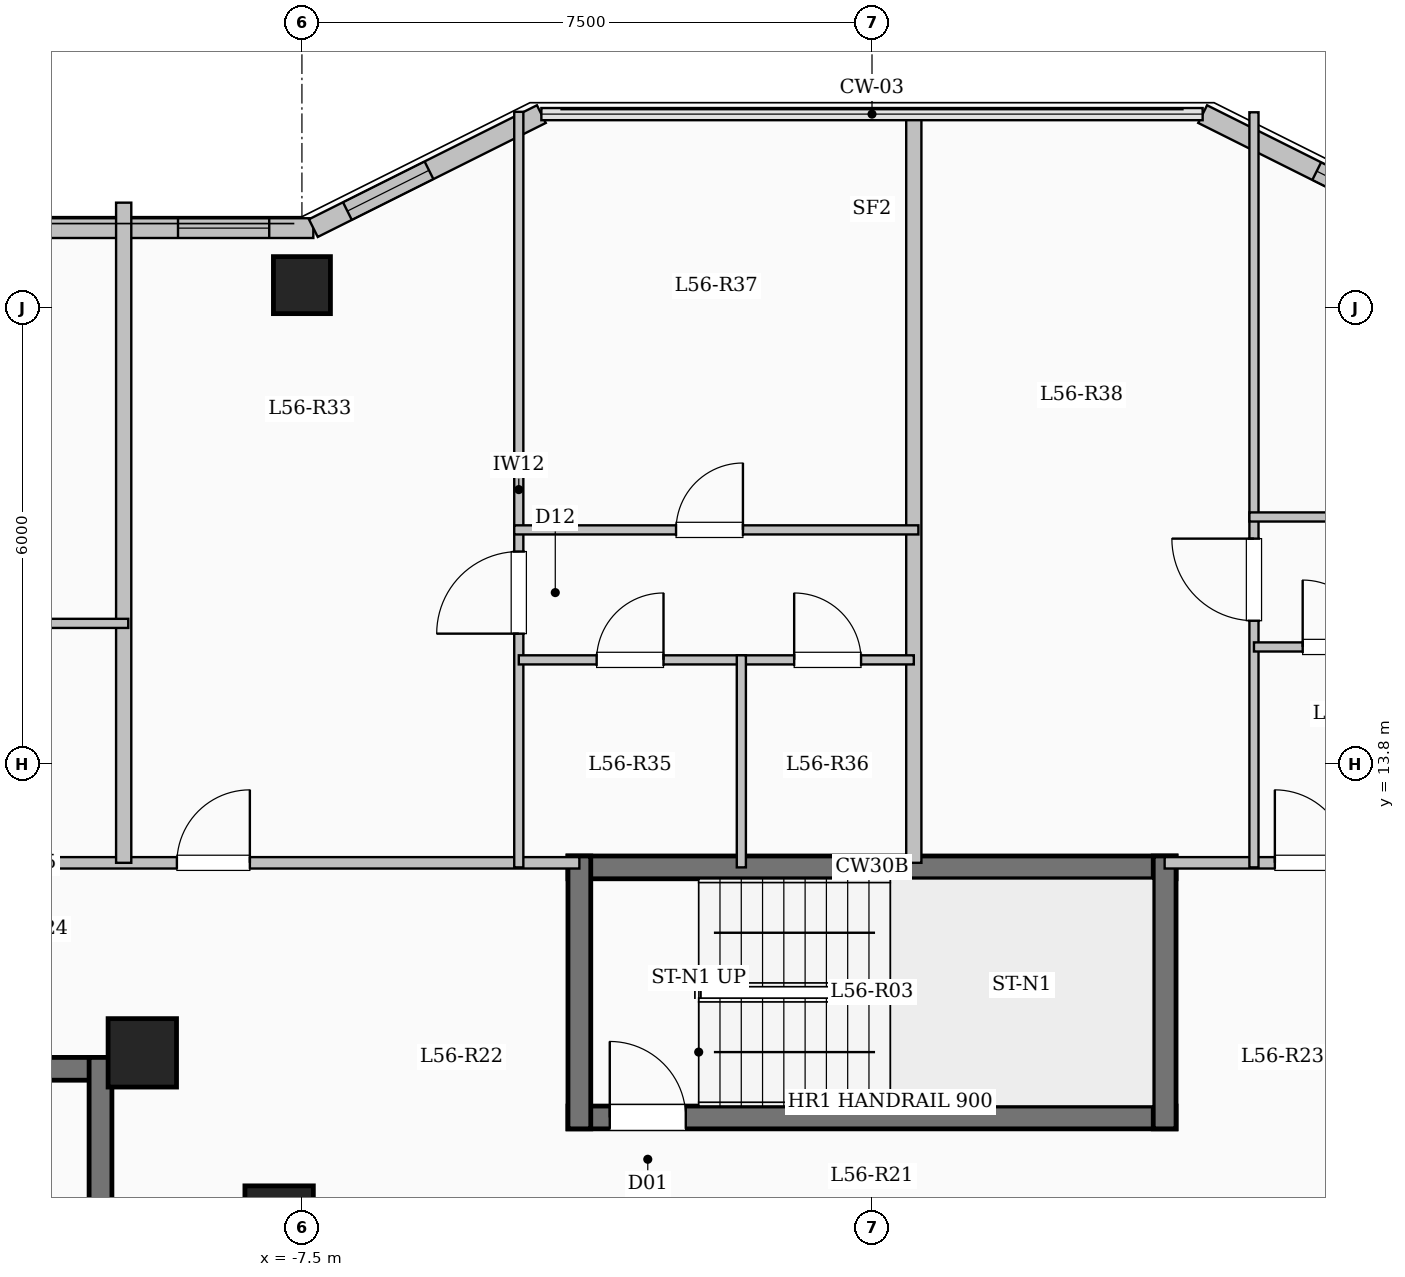
"""IFC4 building model, lengths in metres.
Left out: names, types, materials, properties, quantities, classifications, styles, units other than length and angle.
Written with IfcOpenShell. Run it as: python <this file> out.ifc"""

import sys

from ifc_helpers import new_model, si_unit, direction, frame, frame_2d, origin, origin_2d, place, context, subcontext, project, spatial, rectangle, extrude, element, fill, save


model = new_model("IFC4")
c1 = context("Model", 3, precision=1e-05, world=origin(), true_north=direction((0.0, 1.0)))
c2 = subcontext(c1, "Body", "Model", "MODEL_VIEW")
j1 = project(units=[si_unit("LENGTHUNIT", "METRE"), si_unit("PLANEANGLEUNIT", "RADIAN")], contexts=[c1])
p1 = place(None, origin())
s1 = spatial("IfcSite", under=j1, at=p1, CompositionType="ELEMENT")
p2 = place(p1, origin())
s2 = spatial("IfcBuilding", under=s1, at=p2, CompositionType="ELEMENT")
p3 = place(p2, frame((0.0, 0.0, 207.0)))
s3 = spatial("IfcBuildingStorey", under=s2, at=p3, CompositionType="ELEMENT", Elevation=207.0)
for number, where, z_axis, x_axis in (
    (1, (-7.8, 7.8, 0.0), (0.0, 0.0, 1.0), (1.0, 0.0, 0.0)),
    (2, (-9.6, 10.0, 0.0), (0.0, 0.0, 1.0), (1.0, 0.0, 0.0)),
):
    element("IfcColumn", number, at=place(p3, frame(where, z_axis=z_axis, x_axis=x_axis)), inside=s3, PredefinedType="COLUMN", context=c2, shape_type="SweptSolid", body=[
        extrude(rectangle(XDim=0.9, YDim=0.9, at=origin_2d()), origin(), (0.0, 0.0, 1.0), 3.35),
    ])
p4 = place(p3, frame((-7.5, 20.1, 0.0), z_axis=(0.0, 0.0, 1.0), x_axis=(1.0, 0.0, 0.0)))
e3 = element("IfcColumn", 3, at=p4, inside=s3, PredefinedType="COLUMN", context=c2, shape_type="SweptSolid", body=[
    extrude(rectangle(XDim=0.75, YDim=0.75, at=origin_2d()), origin(), (0.0, 0.0, 1.0), 3.35),
])
p5 = place(p3, frame((-18.45, 20.85, 0.0), z_axis=(0.0, 0.0, 1.0), x_axis=(1.0, 0.0, 0.0)))
e4 = element("IfcWall", 4, at=p5, inside=s3, PredefinedType="SOLIDWALL", context=c2, shape_type="SweptSolid", body=[
    extrude(rectangle(XDim=11.1, YDim=0.26, at=frame_2d((5.55, 0.0))), origin(), (0.0, 0.0, 1.0), 3.1),
])
p6 = place(p5, frame((1.11, 0.0, 0.9)))
e5 = element("IfcOpeningElement", 5, at=p6, cuts=e4, PredefinedType="OPENING", context=c2, shape_type="SweptSolid", body=[
    extrude(rectangle(XDim=2.2, YDim=1.75, at=frame_2d((1.1, 0.875))), frame((0.0, 0.14, 0.0), z_axis=(0.0, -1.0, 0.0), x_axis=(1.0, 0.0, 0.0)), (0.0, 0.0, 1.0), 0.28),
])
p7 = place(p5, frame((5.654, 0.0, 0.9)))
e6 = element("IfcOpeningElement", 6, at=p7, cuts=e4, PredefinedType="OPENING", context=c2, shape_type="SweptSolid", body=[
    extrude(rectangle(XDim=1.65, YDim=1.6, at=frame_2d((0.825, 0.8))), frame((0.0, 0.14, 0.0), z_axis=(0.0, -1.0, 0.0), x_axis=(1.0, 0.0, 0.0)), (0.0, 0.0, 1.0), 0.28),
])
p8 = place(p5, frame((9.32, 0.0, 0.95)))
e7 = element("IfcOpeningElement", 7, at=p8, cuts=e4, PredefinedType="OPENING", context=c2, shape_type="SweptSolid", body=[
    extrude(rectangle(XDim=1.2, YDim=1.5, at=frame_2d((0.6, 0.75))), frame((0.0, 0.14, 0.0), z_axis=(0.0, -1.0, 0.0), x_axis=(1.0, 0.0, 0.0)), (0.0, 0.0, 1.0), 0.28),
])
p9 = place(p3, frame((-7.35, 20.85, 0.0), z_axis=(0.0, 0.0, 1.0), x_axis=(0.894427191, 0.4472135955, 0.0)))
e8 = element("IfcWall", 8, at=p9, inside=s3, PredefinedType="SOLIDWALL", context=c2, shape_type="SweptSolid", body=[
    extrude(rectangle(XDim=3.354, YDim=0.26, at=frame_2d((1.677, 0.0))), origin(), (0.0, 0.0, 1.0), 3.1),
])
p10 = place(p9, frame((0.501, 0.0, 0.95)))
e9 = element("IfcOpeningElement", 9, at=p10, cuts=e8, PredefinedType="OPENING", context=c2, shape_type="SweptSolid", body=[
    extrude(rectangle(XDim=1.2, YDim=1.5, at=frame_2d((0.6, 0.75))), frame((0.0, 0.14, 0.0), z_axis=(0.0, -1.0, 0.0), x_axis=(1.0, 0.0, 0.0)), (0.0, 0.0, 1.0), 0.28),
])
p11 = place(p3, frame((4.35, 22.35, 0.0), z_axis=(0.0, 0.0, 1.0), x_axis=(0.894427191, -0.4472135955, 0.0)))
e10 = element("IfcWall", 10, at=p11, inside=s3, PredefinedType="SOLIDWALL", context=c2, shape_type="SweptSolid", body=[
    extrude(rectangle(XDim=3.354, YDim=0.26, at=frame_2d((1.677, 0.0))), origin(), (0.0, 0.0, 1.0), 3.1),
])
p12 = place(p11, frame((1.678, 0.0, 0.95)))
e11 = element("IfcOpeningElement", 11, at=p12, cuts=e10, PredefinedType="OPENING", context=c2, shape_type="SweptSolid", body=[
    extrude(rectangle(XDim=1.2, YDim=1.5, at=frame_2d((0.6, 0.75))), frame((0.0, 0.14, 0.0), z_axis=(0.0, -1.0, 0.0), x_axis=(1.0, 0.0, 0.0)), (0.0, 0.0, 1.0), 0.28),
])
p13 = place(p3, frame((-18.0, 9.79, 0.0), z_axis=(0.0, 0.0, 1.0), x_axis=(1.0, 0.0, 0.0)))
e12 = element("IfcWall", 12, at=p13, inside=s3, PredefinedType="SHEAR", context=c2, shape_type="SweptSolid", body=[
    extrude(rectangle(XDim=8.0, YDim=0.3, at=frame_2d((4.0, 0.0))), origin(), (0.0, 0.0, 1.0), 3.35),
])
p14 = place(p3, frame((-10.15, 6.35, 0.0), z_axis=(0.0, 0.0, 1.0), x_axis=(0.0, 1.0, 0.0)))
e13 = element("IfcWall", 13, at=p14, inside=s3, PredefinedType="SHEAR", context=c2, shape_type="SweptSolid", body=[
    extrude(rectangle(XDim=3.59, YDim=0.3, at=frame_2d((1.795, 0.0))), origin(), (0.0, 0.0, 1.0), 3.35),
])
p15 = place(p3, frame((-4.0, 12.44, 0.0), z_axis=(0.0, 0.0, 1.0), x_axis=(1.0, 0.0, 0.0)))
e14 = element("IfcWall", 14, at=p15, inside=s3, PredefinedType="SHEAR", context=c2, shape_type="SweptSolid", body=[
    extrude(rectangle(XDim=8.0, YDim=0.3, at=frame_2d((4.0, 0.0))), origin(), (0.0, 0.0, 1.0), 3.35),
])
p16 = place(p3, frame((-4.0, 9.15, 0.0), z_axis=(0.0, 0.0, 1.0), x_axis=(1.0, 0.0, 0.0)))
e15 = element("IfcWall", 15, at=p16, inside=s3, PredefinedType="SHEAR", context=c2, shape_type="SweptSolid", body=[
    extrude(rectangle(XDim=8.0, YDim=0.3, at=frame_2d((4.0, 0.0))), origin(), (0.0, 0.0, 1.0), 3.35),
])
p17 = place(p16, frame((0.55, 0.0, 0.0)))
e16 = element("IfcOpeningElement", 16, at=p17, cuts=e15, PredefinedType="OPENING", context=c2, shape_type="SweptSolid", body=[
    extrude(rectangle(XDim=1.0, YDim=2.15, at=frame_2d((0.5, 1.075))), frame((0.0, 0.16, 0.0), z_axis=(0.0, -1.0, 0.0), x_axis=(1.0, 0.0, 0.0)), (0.0, 0.0, 1.0), 0.32),
])
for number, where, z_axis, x_axis in (
    (17, (-3.85, 9.0, 0.0), (0.0, 0.0, 1.0), (0.0, 1.0, 0.0)),
    (18, (3.85, 9.0, 0.0), (0.0, 0.0, 1.0), (0.0, 1.0, 0.0)),
):
    element("IfcWall", number, at=place(p3, frame(where, z_axis=z_axis, x_axis=x_axis)), inside=s3, PredefinedType="SHEAR", context=c2, shape_type="SweptSolid", body=[
        extrude(rectangle(XDim=3.59, YDim=0.3, at=frame_2d((1.795, 0.0))), origin(), (0.0, 0.0, 1.0), 3.35),
    ])
p18 = place(p3, frame((-18.35, 12.5, 0.0), z_axis=(0.0, 0.0, 1.0), x_axis=(1.0, 0.0, 0.0)))
e19 = element("IfcWall", 19, at=p18, inside=s3, PredefinedType="PARTITIONING", context=c2, shape_type="SweptSolid", body=[
    extrude(rectangle(XDim=14.5, YDim=0.15, at=frame_2d((7.25, 0.0))), origin(), (0.0, 0.0, 1.0), 3.1),
])
p19 = place(p18, frame((0.7, 0.0, 0.0)))
e20 = element("IfcOpeningElement", 20, at=p19, cuts=e19, PredefinedType="OPENING", context=c2, shape_type="SweptSolid", body=[
    extrude(rectangle(XDim=0.96, YDim=2.15, at=frame_2d((0.48, 1.075))), frame((0.0, 0.085, 0.0), z_axis=(0.0, -1.0, 0.0), x_axis=(1.0, 0.0, 0.0)), (0.0, 0.0, 1.0), 0.17),
])
p20 = place(p18, frame((9.205, 0.0, 0.0)))
e21 = element("IfcOpeningElement", 21, at=p20, cuts=e19, PredefinedType="OPENING", context=c2, shape_type="SweptSolid", body=[
    extrude(rectangle(XDim=0.96, YDim=2.15, at=frame_2d((0.48, 1.075))), frame((0.0, 0.085, 0.0), z_axis=(0.0, -1.0, 0.0), x_axis=(1.0, 0.0, 0.0)), (0.0, 0.0, 1.0), 0.17),
])
p21 = place(p3, frame((3.85, 12.5, 0.0), z_axis=(0.0, 0.0, 1.0), x_axis=(1.0, 0.0, 0.0)))
e22 = element("IfcWall", 22, at=p21, inside=s3, PredefinedType="PARTITIONING", context=c2, shape_type="SweptSolid", body=[
    extrude(rectangle(XDim=14.5, YDim=0.15, at=frame_2d((7.25, 0.0))), origin(), (0.0, 0.0, 1.0), 3.1),
])
p22 = place(p21, frame((1.45, 0.0, 0.0)))
e23 = element("IfcOpeningElement", 23, at=p22, cuts=e22, PredefinedType="OPENING", context=c2, shape_type="SweptSolid", body=[
    extrude(rectangle(XDim=0.96, YDim=2.15, at=frame_2d((0.48, 1.075))), frame((0.0, 0.085, 0.0), z_axis=(0.0, -1.0, 0.0), x_axis=(1.0, 0.0, 0.0)), (0.0, 0.0, 1.0), 0.17),
])
p23 = place(p21, frame((6.35, 0.0, 0.0)))
e24 = element("IfcOpeningElement", 24, at=p23, cuts=e22, PredefinedType="OPENING", context=c2, shape_type="SweptSolid", body=[
    extrude(rectangle(XDim=0.96, YDim=2.15, at=frame_2d((0.48, 1.075))), frame((0.0, 0.085, 0.0), z_axis=(0.0, -1.0, 0.0), x_axis=(1.0, 0.0, 0.0)), (0.0, 0.0, 1.0), 0.17),
])
p24 = place(p3, frame((0.55, 12.5, 0.0), z_axis=(0.0, 0.0, 1.0), x_axis=(0.0, 1.0, 0.0)))
e25 = element("IfcWall", 25, at=p24, inside=s3, PredefinedType="SOLIDWALL", context=c2, shape_type="SweptSolid", body=[
    extrude(rectangle(XDim=9.88, YDim=0.2, at=frame_2d((4.94, 0.0))), origin(), (0.0, 0.0, 1.0), 3.1),
])
p25 = place(p3, frame((-9.845, 12.5, 0.0), z_axis=(0.0, 0.0, 1.0), x_axis=(0.0, 1.0, 0.0)))
e26 = element("IfcWall", 26, at=p25, inside=s3, PredefinedType="SOLIDWALL", context=c2, shape_type="SweptSolid", body=[
    extrude(rectangle(XDim=8.685, YDim=0.2, at=frame_2d((4.343, 0.0))), origin(), (0.0, 0.0, 1.0), 3.1),
])
p26 = place(p3, frame((-14.158, 15.65, 0.0), z_axis=(0.0, 0.0, 1.0), x_axis=(1.0, 0.0, 0.0)))
e27 = element("IfcWall", 27, at=p26, inside=s3, PredefinedType="PARTITIONING", context=c2, shape_type="SweptSolid", body=[
    extrude(rectangle(XDim=4.373, YDim=0.12, at=frame_2d((2.187, 0.0))), origin(), (0.0, 0.0, 1.0), 2.725),
])
p27 = place(p3, frame((-4.647, 12.44, 0.0), z_axis=(0.0, 0.0, 1.0), x_axis=(0.0, 1.0, 0.0)))
e28 = element("IfcWall", 28, at=p27, inside=s3, PredefinedType="PARTITIONING", context=c2, shape_type="SweptSolid", body=[
    extrude(rectangle(XDim=9.94, YDim=0.12, at=frame_2d((4.97, 0.0))), origin(), (0.0, 0.0, 1.0), 3.1),
])
p28 = place(p27, frame((3.075, 0.0, 0.0)))
e29 = element("IfcOpeningElement", 29, at=p28, cuts=e28, PredefinedType="OPENING", context=c2, shape_type="SweptSolid", body=[
    extrude(rectangle(XDim=1.08, YDim=2.15, at=frame_2d((0.54, 1.075))), frame((0.0, 0.07, 0.0), z_axis=(0.0, -1.0, 0.0), x_axis=(1.0, 0.0, 0.0)), (0.0, 0.0, 1.0), 0.14),
])
p29 = place(p3, frame((-4.647, 15.17, 0.0), z_axis=(0.0, 0.0, 1.0), x_axis=(1.0, 0.0, 0.0)))
e30 = element("IfcWall", 30, at=p29, inside=s3, PredefinedType="PARTITIONING", context=c2, shape_type="SweptSolid", body=[
    extrude(rectangle(XDim=2.928, YDim=0.12, at=frame_2d((1.464, 0.0))), origin(), (0.0, 0.0, 1.0), 3.1),
])
p30 = place(p29, frame((1.024, 0.0, 0.0)))
e31 = element("IfcOpeningElement", 31, at=p30, cuts=e30, PredefinedType="OPENING", context=c2, shape_type="SweptSolid", body=[
    extrude(rectangle(XDim=0.88, YDim=2.1, at=frame_2d((0.44, 1.05))), frame((0.0, 0.07, 0.0), z_axis=(0.0, -1.0, 0.0), x_axis=(1.0, 0.0, 0.0)), (0.0, 0.0, 1.0), 0.14),
])
p31 = place(p3, frame((-1.719, 15.17, 0.0), z_axis=(0.0, 0.0, 1.0), x_axis=(1.0, 0.0, 0.0)))
e32 = element("IfcWall", 32, at=p31, inside=s3, PredefinedType="PARTITIONING", context=c2, shape_type="SweptSolid", body=[
    extrude(rectangle(XDim=2.269, YDim=0.12, at=frame_2d((1.135, 0.0))), origin(), (0.0, 0.0, 1.0), 3.1),
])
p32 = place(p31, frame((0.695, 0.0, 0.0)))
e33 = element("IfcOpeningElement", 33, at=p32, cuts=e32, PredefinedType="OPENING", context=c2, shape_type="SweptSolid", body=[
    extrude(rectangle(XDim=0.88, YDim=2.1, at=frame_2d((0.44, 1.05))), frame((0.0, 0.07, 0.0), z_axis=(0.0, -1.0, 0.0), x_axis=(1.0, 0.0, 0.0)), (0.0, 0.0, 1.0), 0.14),
])
p33 = place(p3, frame((-4.707, 16.88, 0.0), z_axis=(0.0, 0.0, 1.0), x_axis=(1.0, 0.0, 0.0)))
e34 = element("IfcWall", 34, at=p33, inside=s3, PredefinedType="PARTITIONING", context=c2, shape_type="SweptSolid", body=[
    extrude(rectangle(XDim=5.317, YDim=0.12, at=frame_2d((2.659, 0.0))), origin(), (0.0, 0.0, 1.0), 2.725),
])
p34 = place(p33, frame((2.129, 0.0, 0.0)))
e35 = element("IfcOpeningElement", 35, at=p34, cuts=e34, PredefinedType="OPENING", context=c2, shape_type="SweptSolid", body=[
    extrude(rectangle(XDim=0.88, YDim=2.1, at=frame_2d((0.44, 1.05))), frame((0.0, 0.07, 0.0), z_axis=(0.0, -1.0, 0.0), x_axis=(1.0, 0.0, 0.0)), (0.0, 0.0, 1.0), 0.14),
])
p35 = place(p3, frame((-1.719, 12.44, 0.0), z_axis=(0.0, 0.0, 1.0), x_axis=(0.0, 1.0, 0.0)))
e36 = element("IfcWall", 36, at=p35, inside=s3, PredefinedType="PARTITIONING", context=c2, shape_type="SweptSolid", body=[
    extrude(rectangle(XDim=2.79, YDim=0.12, at=frame_2d((1.395, 0.0))), origin(), (0.0, 0.0, 1.0), 3.1),
])
p36 = place(p3, frame((5.025, 12.44, 0.0), z_axis=(0.0, 0.0, 1.0), x_axis=(0.0, 1.0, 0.0)))
e37 = element("IfcWall", 37, at=p36, inside=s3, PredefinedType="PARTITIONING", context=c2, shape_type="SweptSolid", body=[
    extrude(rectangle(XDim=9.934, YDim=0.12, at=frame_2d((4.967, 0.0))), origin(), (0.0, 0.0, 1.0), 3.1),
])
p37 = place(p36, frame((3.245, 0.0, 0.0)))
e38 = element("IfcOpeningElement", 38, at=p37, cuts=e37, PredefinedType="OPENING", context=c2, shape_type="SweptSolid", body=[
    extrude(rectangle(XDim=1.08, YDim=2.15, at=frame_2d((0.54, 1.075))), frame((0.0, 0.07, 0.0), z_axis=(0.0, -1.0, 0.0), x_axis=(1.0, 0.0, 0.0)), (0.0, 0.0, 1.0), 0.14),
])
p38 = place(p3, frame((5.025, 15.34, 0.0), z_axis=(0.0, 0.0, 1.0), x_axis=(1.0, 0.0, 0.0)))
e39 = element("IfcWall", 39, at=p38, inside=s3, PredefinedType="PARTITIONING", context=c2, shape_type="SweptSolid", body=[
    extrude(rectangle(XDim=2.163, YDim=0.12, at=frame_2d((1.082, 0.0))), origin(), (0.0, 0.0, 1.0), 2.725),
])
p39 = place(p38, frame((0.641, 0.0, 0.0)))
e40 = element("IfcOpeningElement", 40, at=p39, cuts=e39, PredefinedType="OPENING", context=c2, shape_type="SweptSolid", body=[
    extrude(rectangle(XDim=0.88, YDim=2.1, at=frame_2d((0.44, 1.05))), frame((0.0, 0.07, 0.0), z_axis=(0.0, -1.0, 0.0), x_axis=(1.0, 0.0, 0.0)), (0.0, 0.0, 1.0), 0.14),
])
p40 = place(p3, frame((4.965, 17.05, 0.0), z_axis=(0.0, 0.0, 1.0), x_axis=(1.0, 0.0, 0.0)))
e41 = element("IfcWall", 41, at=p40, inside=s3, PredefinedType="PARTITIONING", context=c2, shape_type="SweptSolid", body=[
    extrude(rectangle(XDim=4.595, YDim=0.12, at=frame_2d((2.297, 0.0))), origin(), (0.0, 0.0, 1.0), 2.725),
])
p41 = place(p40, frame((1.767, 0.0, 0.0)))
e42 = element("IfcOpeningElement", 42, at=p41, cuts=e41, PredefinedType="OPENING", context=c2, shape_type="SweptSolid", body=[
    extrude(rectangle(XDim=0.88, YDim=2.1, at=frame_2d((0.44, 1.05))), frame((0.0, 0.07, 0.0), z_axis=(0.0, -1.0, 0.0), x_axis=(1.0, 0.0, 0.0)), (0.0, 0.0, 1.0), 0.14),
])
p42 = place(p8, origin())
e43 = element("IfcWindow", 43, at=p42, inside=s3, PartitioningType="SINGLE_PANEL", PredefinedType="WINDOW", context=c2, shape_type="SweptSolid", body=[
    extrude(rectangle(XDim=1.2, YDim=1.5, at=frame_2d((0.6, 0.75))), frame((0.0, 0.03, 0.0), z_axis=(0.0, -1.0, 0.0), x_axis=(1.0, 0.0, 0.0)), (0.0, 0.0, 1.0), 0.06),
])
fill(e7, e43)
p43 = place(p10, origin())
e44 = element("IfcWindow", 44, at=p43, inside=s3, PartitioningType="SINGLE_PANEL", PredefinedType="WINDOW", context=c2, shape_type="SweptSolid", body=[
    extrude(rectangle(XDim=1.2, YDim=1.5, at=frame_2d((0.6, 0.75))), frame((0.0, 0.03, 0.0), z_axis=(0.0, -1.0, 0.0), x_axis=(1.0, 0.0, 0.0)), (0.0, 0.0, 1.0), 0.06),
])
fill(e9, e44)
p44 = place(p12, origin())
e45 = element("IfcWindow", 45, at=p44, inside=s3, PartitioningType="SINGLE_PANEL", PredefinedType="WINDOW", context=c2, shape_type="SweptSolid", body=[
    extrude(rectangle(XDim=1.2, YDim=1.5, at=frame_2d((0.6, 0.75))), frame((0.0, 0.03, 0.0), z_axis=(0.0, -1.0, 0.0), x_axis=(1.0, 0.0, 0.0)), (0.0, 0.0, 1.0), 0.06),
])
fill(e11, e45)
p45 = place(p17, origin())
e46 = element("IfcDoor", 46, at=p45, inside=s3, OperationType="SINGLE_SWING_LEFT", PredefinedType="DOOR", context=c2, shape_type="SweptSolid", body=[
    extrude(rectangle(XDim=1.0, YDim=2.15, at=frame_2d((0.5, 1.075))), frame((0.0, 0.025, 0.0), z_axis=(0.0, -1.0, 0.0), x_axis=(1.0, 0.0, 0.0)), (0.0, 0.0, 1.0), 0.05),
])
fill(e16, e46)
p46 = place(p20, origin())
e47 = element("IfcDoor", 47, at=p46, inside=s3, OperationType="SINGLE_SWING_RIGHT", PredefinedType="DOOR", context=c2, shape_type="SweptSolid", body=[
    extrude(rectangle(XDim=0.96, YDim=2.15, at=frame_2d((0.48, 1.075))), frame((0.0, 0.025, 0.0), z_axis=(0.0, -1.0, 0.0), x_axis=(1.0, 0.0, 0.0)), (0.0, 0.0, 1.0), 0.05),
])
fill(e21, e47)
p47 = place(p28, origin())
e48 = element("IfcDoor", 48, at=p47, inside=s3, OperationType="SINGLE_SWING_LEFT", PredefinedType="DOOR", context=c2, shape_type="SweptSolid", body=[
    extrude(rectangle(XDim=1.08, YDim=2.15, at=frame_2d((0.54, 1.075))), frame((0.0, 0.025, 0.0), z_axis=(0.0, -1.0, 0.0), x_axis=(1.0, 0.0, 0.0)), (0.0, 0.0, 1.0), 0.05),
])
fill(e29, e48)
p48 = place(p30, origin())
e49 = element("IfcDoor", 49, at=p48, inside=s3, OperationType="SINGLE_SWING_RIGHT", PredefinedType="DOOR", context=c2, shape_type="SweptSolid", body=[
    extrude(rectangle(XDim=0.88, YDim=2.1, at=frame_2d((0.44, 1.05))), frame((0.0, 0.025, 0.0), z_axis=(0.0, -1.0, 0.0), x_axis=(1.0, 0.0, 0.0)), (0.0, 0.0, 1.0), 0.05),
])
fill(e31, e49)
p49 = place(p32, origin())
e50 = element("IfcDoor", 50, at=p49, inside=s3, OperationType="SINGLE_SWING_LEFT", PredefinedType="DOOR", context=c2, shape_type="SweptSolid", body=[
    extrude(rectangle(XDim=0.88, YDim=2.1, at=frame_2d((0.44, 1.05))), frame((0.0, 0.025, 0.0), z_axis=(0.0, -1.0, 0.0), x_axis=(1.0, 0.0, 0.0)), (0.0, 0.0, 1.0), 0.05),
])
fill(e33, e50)
p50 = place(p34, origin())
e51 = element("IfcDoor", 51, at=p50, inside=s3, OperationType="SINGLE_SWING_RIGHT", PredefinedType="DOOR", context=c2, shape_type="SweptSolid", body=[
    extrude(rectangle(XDim=0.88, YDim=2.1, at=frame_2d((0.44, 1.05))), frame((0.0, 0.025, 0.0), z_axis=(0.0, -1.0, 0.0), x_axis=(1.0, 0.0, 0.0)), (0.0, 0.0, 1.0), 0.05),
])
fill(e35, e51)
p51 = place(p22, origin())
e52 = element("IfcDoor", 52, at=p51, inside=s3, OperationType="SINGLE_SWING_LEFT", PredefinedType="DOOR", context=c2, shape_type="SweptSolid", body=[
    extrude(rectangle(XDim=0.96, YDim=2.15, at=frame_2d((0.48, 1.075))), frame((0.0, 0.025, 0.0), z_axis=(0.0, -1.0, 0.0), x_axis=(1.0, 0.0, 0.0)), (0.0, 0.0, 1.0), 0.05),
])
fill(e23, e52)
p52 = place(p37, origin())
e53 = element("IfcDoor", 53, at=p52, inside=s3, OperationType="SINGLE_SWING_RIGHT", PredefinedType="DOOR", context=c2, shape_type="SweptSolid", body=[
    extrude(rectangle(XDim=1.08, YDim=2.15, at=frame_2d((0.54, 1.075))), frame((0.0, 0.025, 0.0), z_axis=(0.0, -1.0, 0.0), x_axis=(1.0, 0.0, 0.0)), (0.0, 0.0, 1.0), 0.05),
])
fill(e38, e53)
p53 = place(p39, origin())
e54 = element("IfcDoor", 54, at=p53, inside=s3, OperationType="SINGLE_SWING_LEFT", PredefinedType="DOOR", context=c2, shape_type="SweptSolid", body=[
    extrude(rectangle(XDim=0.88, YDim=2.1, at=frame_2d((0.44, 1.05))), frame((0.0, 0.025, 0.0), z_axis=(0.0, -1.0, 0.0), x_axis=(1.0, 0.0, 0.0)), (0.0, 0.0, 1.0), 0.05),
])
fill(e40, e54)
save(model, sys.argv[1])
